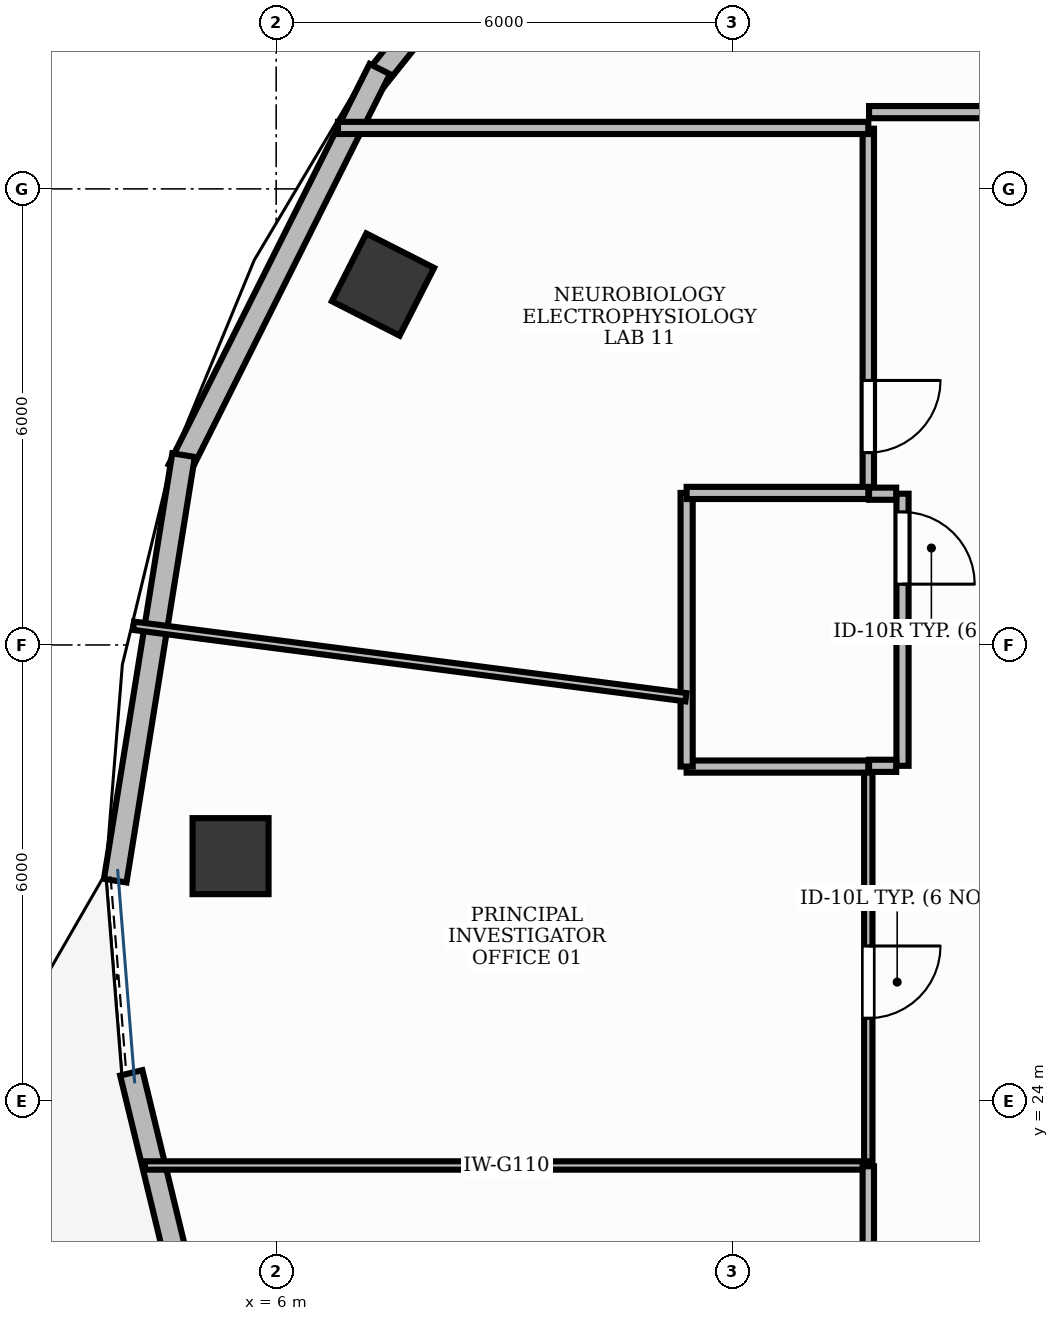
"""IFC4 building model, lengths in metres.
Left out: names, types, materials, properties, quantities, classifications, styles, units other than length and angle.
Written with IfcOpenShell. Run it as: python <this file> out.ifc"""

import sys

from ifc_helpers import new_model, si_unit, direction, frame, frame_2d, origin, origin_2d, place, context, subcontext, project, spatial, rectangle, extrude, element, fill, save


model = new_model("IFC4")
c1 = context("Model", 3, precision=1e-05, world=origin(), true_north=direction((0.0, 1.0)))
c2 = subcontext(c1, "Body", "Model", "MODEL_VIEW")
j1 = project(units=[si_unit("LENGTHUNIT", "METRE"), si_unit("PLANEANGLEUNIT", "RADIAN")], contexts=[c1])
p1 = place(None, origin())
s1 = spatial("IfcSite", under=j1, at=p1, CompositionType="ELEMENT")
p2 = place(p1, origin())
s2 = spatial("IfcBuilding", under=s1, at=p2, CompositionType="ELEMENT")
p3 = place(p2, frame((0.0, 0.0, 226.8)))
s3 = spatial("IfcBuildingStorey", under=s2, at=p3, CompositionType="ELEMENT", Elevation=226.8)
for number, where, z_axis, x_axis in (
    (1, (7.405, 34.741, -0.0), (0.0, 0.0, 1.0), (0.453, 0.891, 0.0)),
    (2, (5.4, 27.222, -0.0), (0.0, 0.0, 1.0), (0.0, 1.0, 0.0)),
):
    element("IfcColumn", number, at=place(p3, frame(where, z_axis=z_axis, x_axis=x_axis)), inside=s3, PredefinedType="COLUMN", context=c2, shape_type="SweptSolid", body=[
        extrude(rectangle(XDim=1.0, YDim=1.0, at=origin_2d()), origin(), (0.0, 0.0, 1.0), 3.901),
    ])
p4 = place(p3, frame((9.244, 39.868, 0.0), z_axis=(0.0, 0.0, 1.0), x_axis=(-0.624095877763, -0.781347768512, 0.0)))
e3 = element("IfcWall", 3, at=p4, inside=s3, PredefinedType="STANDARD", context=c2, shape_type="SweptSolid", body=[
    extrude(rectangle(XDim=3.132, YDim=0.3, at=frame_2d((1.566, 0.0))), origin(), (0.0, 0.0, 1.0), 3.9),
])
p5 = place(p4, frame((0.816, 0.0, 0.95)))
e4 = element("IfcOpeningElement", 4, at=p5, cuts=e3, PredefinedType="OPENING", context=c2, shape_type="SweptSolid", body=[
    extrude(rectangle(XDim=1.5, YDim=1.8, at=frame_2d((0.75, 0.9))), frame((0.0, 0.165, 0.0), z_axis=(0.0, -1.0, 0.0), x_axis=(1.0, 0.0, 0.0)), (0.0, 0.0, 1.0), 0.33),
])
p6 = place(p3, frame((7.363, 37.577, 0.0), z_axis=(0.0, 0.0, 1.0), x_axis=(-0.448240215972, -0.893913143871, 0.0)))
e5 = element("IfcWall", 5, at=p6, inside=s3, PredefinedType="STANDARD", context=c2, shape_type="SweptSolid", body=[
    extrude(rectangle(XDim=5.896, YDim=0.3, at=frame_2d((2.948, 0.0))), origin(), (0.0, 0.0, 1.0), 3.47),
])
p7 = place(p3, frame((4.782, 32.497, 0.0), z_axis=(0.0, 0.0, 1.0), x_axis=(-0.158573166105, -0.987347229191, 0.0)))
e6 = element("IfcWall", 6, at=p7, inside=s3, PredefinedType="STANDARD", context=c2, shape_type="SweptSolid", body=[
    extrude(rectangle(XDim=5.67, YDim=0.3, at=frame_2d((2.835, 0.0))), origin(), (0.0, 0.0, 1.0), 3.47),
])
p8 = place(p3, frame((4.094, 24.371, 0.0), z_axis=(0.0, 0.0, 1.0), x_axis=(0.235531068122, -0.971866820068, 0.0)))
e7 = element("IfcWall", 7, at=p8, inside=s3, PredefinedType="STANDARD", context=c2, shape_type="SweptSolid", body=[
    extrude(rectangle(XDim=2.939, YDim=0.3, at=frame_2d((1.469, 0.0))), origin(), (0.0, 0.0, 1.0), 3.9),
])
p9 = place(p3, frame((14.24, 31.99, 0.0), z_axis=(0.0, 0.0, 1.0), x_axis=(0.0, -1.0, 0.0)))
e8 = element("IfcWall", 8, at=p9, inside=s3, PredefinedType="PARTITIONING", context=c2, shape_type="SweptSolid", body=[
    extrude(rectangle(XDim=3.58, YDim=0.16, at=frame_2d((1.79, 0.0))), origin(), (0.0, 0.0, 1.0), 2.91),
])
p10 = place(p9, frame((0.24, 0.0, 0.0)))
e9 = element("IfcOpeningElement", 9, at=p10, cuts=e8, PredefinedType="OPENING", context=c2, shape_type="SweptSolid", body=[
    extrude(rectangle(XDim=0.95, YDim=2.15, at=frame_2d((0.475, 1.075))), frame((0.0, 0.095, 0.0), z_axis=(0.0, -1.0, 0.0), x_axis=(1.0, 0.0, 0.0)), (0.0, 0.0, 1.0), 0.19),
])
p11 = place(p3, frame((13.79, 28.39, 0.0), z_axis=(0.0, 0.0, 1.0), x_axis=(0.0, -1.0, 0.0)))
e10 = element("IfcWall", 10, at=p11, inside=s3, PredefinedType="MOVABLE", context=c2, shape_type="SweptSolid", body=[
    extrude(rectangle(XDim=5.238, YDim=0.11, at=frame_2d((2.619, 0.0))), origin(), (0.0, 0.0, 1.0), 2.91),
])
p12 = place(p11, frame((2.35, 0.0, 0.0)))
e11 = element("IfcOpeningElement", 11, at=p12, cuts=e10, PredefinedType="OPENING", context=c2, shape_type="SweptSolid", body=[
    extrude(rectangle(XDim=0.95, YDim=2.15, at=frame_2d((0.475, 1.075))), frame((0.0, 0.07, 0.0), z_axis=(0.0, -1.0, 0.0), x_axis=(1.0, 0.0, 0.0)), (0.0, 0.0, 1.0), 0.14),
])
p13 = place(p3, frame((13.79, 36.792, 0.0), z_axis=(0.0, 0.0, 1.0), x_axis=(0.0, -1.0, 0.0)))
e12 = element("IfcWall", 12, at=p13, inside=s3, PredefinedType="PARTITIONING", context=c2, shape_type="SweptSolid", body=[
    extrude(rectangle(XDim=4.782, YDim=0.15, at=frame_2d((2.391, 0.0))), origin(), (0.0, 0.0, 1.0), 2.91),
])
p14 = place(p13, frame((3.312, 0.0, 0.0)))
e13 = element("IfcOpeningElement", 13, at=p14, cuts=e12, PredefinedType="OPENING", context=c2, shape_type="SweptSolid", body=[
    extrude(rectangle(XDim=0.95, YDim=2.15, at=frame_2d((0.475, 1.075))), frame((0.0, 0.09, 0.0), z_axis=(0.0, -1.0, 0.0), x_axis=(1.0, 0.0, 0.0)), (0.0, 0.0, 1.0), 0.18),
])
for number, where, z_axis, x_axis in (
    (14, (13.8, 31.99, 0.0), (0.0, 0.0, 1.0), (1.0, 0.0, 0.0)),
    (15, (14.157, 28.41, 0.0), (0.0, 0.0, 1.0), (-1.0, 0.0, 0.0)),
):
    element("IfcWall", number, at=place(p3, frame(where, z_axis=z_axis, x_axis=x_axis)), inside=s3, PredefinedType="PARTITIONING", context=c2, shape_type="SweptSolid", body=[
        extrude(rectangle(XDim=0.357, YDim=0.16, at=frame_2d((0.178, 0.0))), origin(), (0.0, 0.0, 1.0), 2.91),
    ])
p15 = place(p3, frame((13.79, 28.4, 0.0), z_axis=(0.0, 0.0, 1.0), x_axis=(-1.0, 0.0, 0.0)))
e16 = element("IfcWall", 16, at=p15, inside=s3, PredefinedType="PARTITIONING", context=c2, shape_type="SweptSolid", body=[
    extrude(rectangle(XDim=2.39, YDim=0.16, at=frame_2d((1.195, 0.0))), origin(), (0.0, 0.0, 1.0), 2.91),
])
p16 = place(p3, frame((11.4, 28.4, 0.0), z_axis=(0.0, 0.0, 1.0), x_axis=(0.0, 1.0, 0.0)))
e17 = element("IfcWall", 17, at=p16, inside=s3, PredefinedType="PARTITIONING", context=c2, shape_type="SweptSolid", body=[
    extrude(rectangle(XDim=3.6, YDim=0.16, at=frame_2d((1.8, 0.0))), origin(), (0.0, 0.0, 1.0), 2.91),
])
p17 = place(p3, frame((11.4, 32.0, 0.0), z_axis=(0.0, 0.0, 1.0), x_axis=(1.0, 0.0, 0.0)))
e18 = element("IfcWall", 18, at=p17, inside=s3, PredefinedType="PARTITIONING", context=c2, shape_type="SweptSolid", body=[
    extrude(rectangle(XDim=2.39, YDim=0.16, at=frame_2d((1.195, 0.0))), origin(), (0.0, 0.0, 1.0), 2.91),
])
p18 = place(p3, frame((4.123, 30.253, 0.0), z_axis=(0.0, 0.0, 1.0), x_axis=(0.991734568624, -0.128306451111, 0.0)))
e19 = element("IfcWall", 19, at=p18, inside=s3, PredefinedType="MOVABLE", context=c2, shape_type="SweptSolid", body=[
    extrude(rectangle(XDim=7.328, YDim=0.11, at=frame_2d((3.664, 0.0))), origin(), (0.0, 0.0, 1.0), 2.91),
])
p19 = place(p3, frame((13.79, 23.152, 0.0), z_axis=(0.0, 0.0, 1.0), x_axis=(-1.0, 0.0, 0.0)))
e20 = element("IfcWall", 20, at=p19, inside=s3, PredefinedType="MOVABLE", context=c2, shape_type="SweptSolid", body=[
    extrude(rectangle(XDim=9.517, YDim=0.11, at=frame_2d((4.758, 0.0))), origin(), (0.0, 0.0, 1.0), 2.91),
])
p20 = place(p3, frame((13.79, 23.142, 0.0), z_axis=(0.0, 0.0, 1.0), x_axis=(0.0, -1.0, 0.0)))
e21 = element("IfcWall", 21, at=p20, inside=s3, PredefinedType="PARTITIONING", context=c2, shape_type="SweptSolid", body=[
    extrude(rectangle(XDim=10.046, YDim=0.15, at=frame_2d((5.023, 0.0))), origin(), (0.0, 0.0, 1.0), 2.91),
])
p21 = place(p3, frame((17.6, 37.01, 0.0), z_axis=(0.0, 0.0, 1.0), x_axis=(-1.0, 0.0, 0.0)))
e22 = element("IfcWall", 22, at=p21, inside=s3, PredefinedType="PARTITIONING", context=c2, shape_type="SweptSolid", body=[
    extrude(rectangle(XDim=3.8, YDim=0.16, at=frame_2d((1.9, 0.0))), origin(), (0.0, 0.0, 1.0), 2.91),
])
p22 = place(p3, frame((13.79, 36.802, 0.0), z_axis=(0.0, 0.0, 1.0), x_axis=(-1.0, 0.0, 0.0)))
e23 = element("IfcWall", 23, at=p22, inside=s3, PredefinedType="PARTITIONING", context=c2, shape_type="SweptSolid", body=[
    extrude(rectangle(XDim=6.976, YDim=0.16, at=frame_2d((3.488, 0.0))), origin(), (0.0, 0.0, 1.0), 2.91),
])
p23 = place(p10, origin())
e24 = element("IfcDoor", 24, at=p23, inside=s3, OperationType="SINGLE_SWING_RIGHT", PredefinedType="DOOR", context=c2, shape_type="SweptSolid", body=[
    extrude(rectangle(XDim=0.95, YDim=2.15, at=frame_2d((0.475, 1.075))), frame((0.0, 0.025, 0.0), z_axis=(0.0, -1.0, 0.0), x_axis=(1.0, 0.0, 0.0)), (0.0, 0.0, 1.0), 0.05),
])
fill(e9, e24)
p24 = place(p12, origin())
e25 = element("IfcDoor", 25, at=p24, inside=s3, OperationType="SINGLE_SWING_LEFT", PredefinedType="DOOR", context=c2, shape_type="SweptSolid", body=[
    extrude(rectangle(XDim=0.95, YDim=2.15, at=frame_2d((0.475, 1.075))), frame((0.0, 0.025, 0.0), z_axis=(0.0, -1.0, 0.0), x_axis=(1.0, 0.0, 0.0)), (0.0, 0.0, 1.0), 0.05),
])
fill(e11, e25)
p25 = place(p14, origin())
e26 = element("IfcDoor", 26, at=p25, inside=s3, OperationType="SINGLE_SWING_LEFT", PredefinedType="DOOR", context=c2, shape_type="SweptSolid", body=[
    extrude(rectangle(XDim=0.95, YDim=2.15, at=frame_2d((0.475, 1.075))), frame((0.0, 0.025, 0.0), z_axis=(0.0, -1.0, 0.0), x_axis=(1.0, 0.0, 0.0)), (0.0, 0.0, 1.0), 0.05),
])
fill(e13, e26)
save(model, sys.argv[1])
